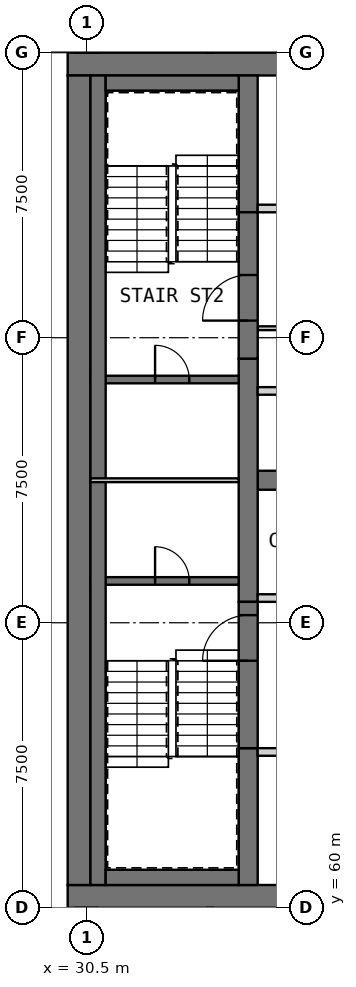
"""IFC4 building model, lengths in metres.
Left out: names, types, materials, properties, quantities, classifications, styles, units other than length and angle.
Written with IfcOpenShell. Run it as: python <this file> out.ifc"""

import sys

from ifc_helpers import new_model, si_unit, direction, frame, frame_2d, origin, place, context, subcontext, project, spatial, rectangle, extrude, element, fill, save


model = new_model("IFC4")
c1 = context("Model", 3, precision=1e-05, world=origin(), true_north=direction((0.0, 1.0)))
c2 = subcontext(c1, "Body", "Model", "MODEL_VIEW")
j1 = project(units=[si_unit("LENGTHUNIT", "METRE"), si_unit("PLANEANGLEUNIT", "RADIAN")], contexts=[c1])
p1 = place(None, origin())
s1 = spatial("IfcSite", under=j1, at=p1, CompositionType="ELEMENT")
p2 = place(p1, origin())
s2 = spatial("IfcBuilding", under=s1, at=p2, CompositionType="ELEMENT")
p3 = place(p2, frame((0.0, 0.0, 226.7)))
s3 = spatial("IfcBuildingStorey", under=s2, at=p3, CompositionType="ELEMENT", Elevation=226.7)
p4 = place(p3, frame((30.0, 60.3, 0.0), z_axis=(0.0, 0.0, 1.0), x_axis=(1.0, 0.0, 0.0)))
e1 = element("IfcWall", 1, at=p4, inside=s3, PredefinedType="SHEAR", context=c2, shape_type="SweptSolid", body=[
    extrude(rectangle(XDim=30.0, YDim=0.6, at=frame_2d((15.0, 0.0))), origin(), (0.0, 0.0, 1.0), 3.5),
])
p5 = place(p4, frame((21.9, 0.0, 0.0)))
e2 = element("IfcOpeningElement", 2, at=p5, cuts=e1, PredefinedType="OPENING", context=c2, shape_type="SweptSolid", body=[
    extrude(rectangle(XDim=1.8, YDim=2.1, at=frame_2d((0.9, 1.05))), frame((0.0, 0.31, 0.0), z_axis=(0.0, -1.0, 0.0), x_axis=(1.0, 0.0, 0.0)), (0.0, 0.0, 1.0), 0.62),
])
p6 = place(p4, frame((26.5, 0.0, 0.0)))
e3 = element("IfcOpeningElement", 3, at=p6, cuts=e1, PredefinedType="OPENING", context=c2, shape_type="SweptSolid", body=[
    extrude(rectangle(XDim=1.2, YDim=2.1, at=frame_2d((0.6, 1.05))), frame((0.0, 0.31, 0.0), z_axis=(0.0, -1.0, 0.0), x_axis=(1.0, 0.0, 0.0)), (0.0, 0.0, 1.0), 0.62),
])
p7 = place(p3, frame((30.0, 82.2, 0.0), z_axis=(0.0, 0.0, 1.0), x_axis=(1.0, 0.0, 0.0)))
e4 = element("IfcWall", 4, at=p7, inside=s3, PredefinedType="SHEAR", context=c2, shape_type="SweptSolid", body=[
    extrude(rectangle(XDim=30.0, YDim=0.6, at=frame_2d((15.0, 0.0))), origin(), (0.0, 0.0, 1.0), 3.5),
])
p8 = place(p3, frame((30.3, 60.6, 0.0), z_axis=(0.0, 0.0, 1.0), x_axis=(0.0, 1.0, 0.0)))
e5 = element("IfcWall", 5, at=p8, inside=s3, PredefinedType="SHEAR", context=c2, shape_type="SweptSolid", body=[
    extrude(rectangle(XDim=21.3, YDim=0.6, at=frame_2d((10.65, 0.0))), origin(), (0.0, 0.0, 1.0), 3.5),
])
p9 = place(p3, frame((35.0, 71.25, 0.0), z_axis=(0.0, 0.0, 1.0), x_axis=(1.0, 0.0, 0.0)))
e6 = element("IfcWall", 6, at=p9, inside=s3, PredefinedType="SHEAR", context=c2, shape_type="SweptSolid", body=[
    extrude(rectangle(XDim=15.6, YDim=0.5, at=frame_2d((7.8, 0.0))), origin(), (0.0, 0.0, 1.0), 3.5),
])
p10 = place(p3, frame((34.75, 60.6, 0.0), z_axis=(0.0, 0.0, 1.0), x_axis=(0.0, 1.0, 0.0)))
e7 = element("IfcWall", 7, at=p10, inside=s3, PredefinedType="SHEAR", context=c2, shape_type="SweptSolid", body=[
    extrude(rectangle(XDim=3.6, YDim=0.5, at=frame_2d((1.8, 0.0))), origin(), (0.0, 0.0, 1.0), 3.5),
])
p11 = place(p3, frame((34.75, 68.05, 0.0), z_axis=(0.0, 0.0, 1.0), x_axis=(0.0, 1.0, 0.0)))
e8 = element("IfcWall", 8, at=p11, inside=s3, PredefinedType="SHEAR", context=c2, shape_type="SweptSolid", body=[
    extrude(rectangle(XDim=6.4, YDim=0.5, at=frame_2d((3.2, 0.0))), origin(), (0.0, 0.0, 1.0), 3.5),
])
p12 = place(p3, frame((34.75, 78.3, 0.0), z_axis=(0.0, 0.0, 1.0), x_axis=(0.0, 1.0, 0.0)))
e9 = element("IfcWall", 9, at=p12, inside=s3, PredefinedType="SHEAR", context=c2, shape_type="SweptSolid", body=[
    extrude(rectangle(XDim=3.6, YDim=0.5, at=frame_2d((1.8, 0.0))), origin(), (0.0, 0.0, 1.0), 3.5),
])
p13 = place(p2, frame((0.0, 0.0, 34.0)))
s4 = spatial("IfcBuildingStorey", under=s2, at=p13, CompositionType="ELEMENT", Elevation=34.0)
for number, where, z_axis, x_axis in (
    (10, (29.7, 61.05, 0.0), (0.0, 0.0, 1.0), (0.0, 1.0, 0.0)),
    (11, (29.7, 65.925, 0.0), (0.0, 0.0, 1.0), (0.0, 1.0, 0.0)),
    (12, (29.7, 70.8, 0.0), (0.0, 0.0, 1.0), (0.0, 1.0, 0.0)),
    (13, (29.7, 75.675, 0.0), (0.0, 0.0, 1.0), (0.0, 1.0, 0.0)),
    (14, (29.7, 80.55, 0.0), (0.0, 0.0, 1.0), (0.0, 1.0, 0.0)),
):
    element("IfcWall", number, at=place(p13, frame(where, z_axis=z_axis, x_axis=x_axis)), inside=s4, PredefinedType="SOLIDWALL", context=c2, shape_type="SweptSolid", body=[
        extrude(rectangle(XDim=0.9, YDim=0.6, at=frame_2d((0.45, 0.0))), origin(), (0.0, 0.0, 1.0), 286.2),
    ])
p14 = place(p3, frame((35.0, 64.1, 0.0), z_axis=(0.0, 0.0, 1.0), x_axis=(1.0, 0.0, 0.0)))
e15 = element("IfcWall", 15, at=p14, inside=s3, PredefinedType="PARTITIONING", context=c2, shape_type="SweptSolid", body=[
    extrude(rectangle(XDim=15.6, YDim=0.2, at=frame_2d((7.8, 0.0))), origin(), (0.0, 0.0, 1.0), 3.25),
])
p15 = place(p14, frame((7.35, 0.0, 0.0)))
e16 = element("IfcOpeningElement", 16, at=p15, cuts=e15, PredefinedType="OPENING", context=c2, shape_type="SweptSolid", body=[
    extrude(rectangle(XDim=0.9, YDim=2.1, at=frame_2d((0.45, 1.05))), frame((0.0, 0.11, 0.0), z_axis=(0.0, -1.0, 0.0), x_axis=(1.0, 0.0, 0.0)), (0.0, 0.0, 1.0), 0.22),
])
p16 = place(p3, frame((35.0, 68.15, 0.0), z_axis=(0.0, 0.0, 1.0), x_axis=(1.0, 0.0, 0.0)))
e17 = element("IfcWall", 17, at=p16, inside=s3, PredefinedType="PARTITIONING", context=c2, shape_type="SweptSolid", body=[
    extrude(rectangle(XDim=15.6, YDim=0.2, at=frame_2d((7.8, 0.0))), origin(), (0.0, 0.0, 1.0), 3.25),
])
p17 = place(p16, frame((2.15, 0.0, 0.0)))
e18 = element("IfcOpeningElement", 18, at=p17, cuts=e17, PredefinedType="OPENING", context=c2, shape_type="SweptSolid", body=[
    extrude(rectangle(XDim=0.9, YDim=2.1, at=frame_2d((0.45, 1.05))), frame((0.0, 0.11, 0.0), z_axis=(0.0, -1.0, 0.0), x_axis=(1.0, 0.0, 0.0)), (0.0, 0.0, 1.0), 0.22),
])
p18 = place(p16, frame((7.35, 0.0, 0.0)))
e19 = element("IfcOpeningElement", 19, at=p18, cuts=e17, PredefinedType="OPENING", context=c2, shape_type="SweptSolid", body=[
    extrude(rectangle(XDim=0.9, YDim=2.1, at=frame_2d((0.45, 1.05))), frame((0.0, 0.11, 0.0), z_axis=(0.0, -1.0, 0.0), x_axis=(1.0, 0.0, 0.0)), (0.0, 0.0, 1.0), 0.22),
])
p19 = place(p16, frame((12.55, 0.0, 0.0)))
e20 = element("IfcOpeningElement", 20, at=p19, cuts=e17, PredefinedType="OPENING", context=c2, shape_type="SweptSolid", body=[
    extrude(rectangle(XDim=0.9, YDim=2.1, at=frame_2d((0.45, 1.05))), frame((0.0, 0.11, 0.0), z_axis=(0.0, -1.0, 0.0), x_axis=(1.0, 0.0, 0.0)), (0.0, 0.0, 1.0), 0.22),
])
p20 = place(p3, frame((35.0, 73.6, 0.0), z_axis=(0.0, 0.0, 1.0), x_axis=(1.0, 0.0, 0.0)))
e21 = element("IfcWall", 21, at=p20, inside=s3, PredefinedType="SOLIDWALL", context=c2, shape_type="SweptSolid", body=[
    extrude(rectangle(XDim=15.6, YDim=0.2, at=frame_2d((7.8, 0.0))), origin(), (0.0, 0.0, 1.0), 3.5),
])
p21 = place(p20, frame((0.75, 0.0, 0.0)))
e22 = element("IfcOpeningElement", 22, at=p21, cuts=e21, PredefinedType="OPENING", context=c2, shape_type="SweptSolid", body=[
    extrude(rectangle(XDim=1.1, YDim=2.1, at=frame_2d((0.55, 1.05))), frame((0.0, 0.11, 0.0), z_axis=(0.0, -1.0, 0.0), x_axis=(1.0, 0.0, 0.0)), (0.0, 0.0, 1.0), 0.22),
])
p22 = place(p20, frame((3.35, 0.0, 0.0)))
e23 = element("IfcOpeningElement", 23, at=p22, cuts=e21, PredefinedType="OPENING", context=c2, shape_type="SweptSolid", body=[
    extrude(rectangle(XDim=1.1, YDim=2.1, at=frame_2d((0.55, 1.05))), frame((0.0, 0.11, 0.0), z_axis=(0.0, -1.0, 0.0), x_axis=(1.0, 0.0, 0.0)), (0.0, 0.0, 1.0), 0.22),
])
p23 = place(p20, frame((5.95, 0.0, 0.0)))
e24 = element("IfcOpeningElement", 24, at=p23, cuts=e21, PredefinedType="OPENING", context=c2, shape_type="SweptSolid", body=[
    extrude(rectangle(XDim=1.1, YDim=2.1, at=frame_2d((0.55, 1.05))), frame((0.0, 0.11, 0.0), z_axis=(0.0, -1.0, 0.0), x_axis=(1.0, 0.0, 0.0)), (0.0, 0.0, 1.0), 0.22),
])
p24 = place(p20, frame((8.55, 0.0, 0.0)))
e25 = element("IfcOpeningElement", 25, at=p24, cuts=e21, PredefinedType="OPENING", context=c2, shape_type="SweptSolid", body=[
    extrude(rectangle(XDim=1.1, YDim=2.1, at=frame_2d((0.55, 1.05))), frame((0.0, 0.11, 0.0), z_axis=(0.0, -1.0, 0.0), x_axis=(1.0, 0.0, 0.0)), (0.0, 0.0, 1.0), 0.22),
])
p25 = place(p20, frame((11.15, 0.0, 0.0)))
e26 = element("IfcOpeningElement", 26, at=p25, cuts=e21, PredefinedType="OPENING", context=c2, shape_type="SweptSolid", body=[
    extrude(rectangle(XDim=1.1, YDim=2.1, at=frame_2d((0.55, 1.05))), frame((0.0, 0.11, 0.0), z_axis=(0.0, -1.0, 0.0), x_axis=(1.0, 0.0, 0.0)), (0.0, 0.0, 1.0), 0.22),
])
p26 = place(p20, frame((13.75, 0.0, 0.0)))
e27 = element("IfcOpeningElement", 27, at=p26, cuts=e21, PredefinedType="OPENING", context=c2, shape_type="SweptSolid", body=[
    extrude(rectangle(XDim=1.1, YDim=2.1, at=frame_2d((0.55, 1.05))), frame((0.0, 0.11, 0.0), z_axis=(0.0, -1.0, 0.0), x_axis=(1.0, 0.0, 0.0)), (0.0, 0.0, 1.0), 0.22),
])
p27 = place(p3, frame((35.0, 78.4, 0.0), z_axis=(0.0, 0.0, 1.0), x_axis=(1.0, 0.0, 0.0)))
e28 = element("IfcWall", 28, at=p27, inside=s3, PredefinedType="SOLIDWALL", context=c2, shape_type="SweptSolid", body=[
    extrude(rectangle(XDim=15.6, YDim=0.2, at=frame_2d((7.8, 0.0))), origin(), (0.0, 0.0, 1.0), 3.5),
])
p28 = place(p27, frame((0.75, 0.0, 0.0)))
e29 = element("IfcOpeningElement", 29, at=p28, cuts=e28, PredefinedType="OPENING", context=c2, shape_type="SweptSolid", body=[
    extrude(rectangle(XDim=1.1, YDim=2.1, at=frame_2d((0.55, 1.05))), frame((0.0, 0.11, 0.0), z_axis=(0.0, -1.0, 0.0), x_axis=(1.0, 0.0, 0.0)), (0.0, 0.0, 1.0), 0.22),
])
p29 = place(p27, frame((3.35, 0.0, 0.0)))
e30 = element("IfcOpeningElement", 30, at=p29, cuts=e28, PredefinedType="OPENING", context=c2, shape_type="SweptSolid", body=[
    extrude(rectangle(XDim=1.1, YDim=2.1, at=frame_2d((0.55, 1.05))), frame((0.0, 0.11, 0.0), z_axis=(0.0, -1.0, 0.0), x_axis=(1.0, 0.0, 0.0)), (0.0, 0.0, 1.0), 0.22),
])
p30 = place(p27, frame((11.15, 0.0, 0.0)))
e31 = element("IfcOpeningElement", 31, at=p30, cuts=e28, PredefinedType="OPENING", context=c2, shape_type="SweptSolid", body=[
    extrude(rectangle(XDim=1.1, YDim=2.1, at=frame_2d((0.55, 1.05))), frame((0.0, 0.11, 0.0), z_axis=(0.0, -1.0, 0.0), x_axis=(1.0, 0.0, 0.0)), (0.0, 0.0, 1.0), 0.22),
])
p31 = place(p27, frame((13.75, 0.0, 0.0)))
e32 = element("IfcOpeningElement", 32, at=p31, cuts=e28, PredefinedType="OPENING", context=c2, shape_type="SweptSolid", body=[
    extrude(rectangle(XDim=1.1, YDim=2.1, at=frame_2d((0.55, 1.05))), frame((0.0, 0.11, 0.0), z_axis=(0.0, -1.0, 0.0), x_axis=(1.0, 0.0, 0.0)), (0.0, 0.0, 1.0), 0.22),
])
p32 = place(p3, frame((35.0, 75.25, 0.0), z_axis=(0.0, 0.0, 1.0), x_axis=(1.0, 0.0, 0.0)))
e33 = element("IfcWall", 33, at=p32, inside=s3, PredefinedType="PARTITIONING", context=c2, shape_type="SweptSolid", body=[
    extrude(rectangle(XDim=5.25, YDim=0.1, at=frame_2d((2.625, 0.0))), origin(), (0.0, 0.0, 1.0), 3.25),
])
p33 = place(p3, frame((34.75, 64.2, 0.0), z_axis=(0.0, 0.0, 1.0), x_axis=(0.0, 1.0, 0.0)))
e34 = element("IfcWall", 34, at=p33, inside=s3, PredefinedType="SOLIDWALL", context=c2, shape_type="SweptSolid", body=[
    extrude(rectangle(XDim=3.85, YDim=0.5, at=frame_2d((1.925, 0.0))), origin(), (0.0, 0.0, 1.0), 2.3),
])
p34 = place(p33, frame((2.3, 0.0, 0.0)))
e35 = element("IfcOpeningElement", 35, at=p34, cuts=e34, PredefinedType="OPENING", context=c2, shape_type="SweptSolid", body=[
    extrude(rectangle(XDim=1.2, YDim=2.1, at=frame_2d((0.6, 1.05))), frame((0.0, 0.26, 0.0), z_axis=(0.0, -1.0, 0.0), x_axis=(1.0, 0.0, 0.0)), (0.0, 0.0, 1.0), 0.52),
])
p35 = place(p3, frame((34.75, 74.45, 0.0), z_axis=(0.0, 0.0, 1.0), x_axis=(0.0, 1.0, 0.0)))
e36 = element("IfcWall", 36, at=p35, inside=s3, PredefinedType="SOLIDWALL", context=c2, shape_type="SweptSolid", body=[
    extrude(rectangle(XDim=3.85, YDim=0.5, at=frame_2d((1.925, 0.0))), origin(), (0.0, 0.0, 1.0), 2.3),
])
p36 = place(p35, frame((1.0, 0.0, 0.0)))
e37 = element("IfcOpeningElement", 37, at=p36, cuts=e36, PredefinedType="OPENING", context=c2, shape_type="SweptSolid", body=[
    extrude(rectangle(XDim=1.2, YDim=2.1, at=frame_2d((0.6, 1.05))), frame((0.0, 0.26, 0.0), z_axis=(0.0, -1.0, 0.0), x_axis=(1.0, 0.0, 0.0)), (0.0, 0.0, 1.0), 0.52),
])
p37 = place(p3, frame((30.6, 68.6, 0.0), z_axis=(0.0, 0.0, 1.0), x_axis=(1.0, 0.0, 0.0)))
e38 = element("IfcWall", 38, at=p37, inside=s3, PredefinedType="SOLIDWALL", context=c2, shape_type="SweptSolid", body=[
    extrude(rectangle(XDim=3.9, YDim=0.2, at=frame_2d((1.95, 0.0))), origin(), (0.0, 0.0, 1.0), 3.25),
])
p38 = place(p37, frame((1.7, 0.0, 0.0)))
e39 = element("IfcOpeningElement", 39, at=p38, cuts=e38, PredefinedType="OPENING", context=c2, shape_type="SweptSolid", body=[
    extrude(rectangle(XDim=0.9, YDim=2.1, at=frame_2d((0.45, 1.05))), frame((0.0, 0.11, 0.0), z_axis=(0.0, -1.0, 0.0), x_axis=(1.0, 0.0, 0.0)), (0.0, 0.0, 1.0), 0.22),
])
p39 = place(p3, frame((30.6, 73.9, 0.0), z_axis=(0.0, 0.0, 1.0), x_axis=(1.0, 0.0, 0.0)))
e40 = element("IfcWall", 40, at=p39, inside=s3, PredefinedType="SOLIDWALL", context=c2, shape_type="SweptSolid", body=[
    extrude(rectangle(XDim=3.9, YDim=0.2, at=frame_2d((1.95, 0.0))), origin(), (0.0, 0.0, 1.0), 3.25),
])
p40 = place(p39, frame((1.7, 0.0, 0.0)))
e41 = element("IfcOpeningElement", 41, at=p40, cuts=e40, PredefinedType="OPENING", context=c2, shape_type="SweptSolid", body=[
    extrude(rectangle(XDim=0.9, YDim=2.1, at=frame_2d((0.45, 1.05))), frame((0.0, 0.11, 0.0), z_axis=(0.0, -1.0, 0.0), x_axis=(1.0, 0.0, 0.0)), (0.0, 0.0, 1.0), 0.22),
])
p41 = place(p3, frame((30.8, 60.6, 0.0), z_axis=(0.0, 0.0, 1.0), x_axis=(0.0, 1.0, 0.0)))
e42 = element("IfcWall", 42, at=p41, inside=s3, PredefinedType="SOLIDWALL", context=c2, shape_type="SweptSolid", body=[
    extrude(rectangle(XDim=21.3, YDim=0.4, at=frame_2d((10.65, 0.0))), origin(), (0.0, 0.0, 1.0), 3.25),
])
for number, where, z_axis, x_axis in (
    (43, (31.0, 60.8, 0.0), (0.0, 0.0, 1.0), (1.0, 0.0, 0.0)),
    (44, (31.0, 81.7, 0.0), (0.0, 0.0, 1.0), (1.0, 0.0, 0.0)),
):
    element("IfcWall", number, at=place(p3, frame(where, z_axis=z_axis, x_axis=x_axis)), inside=s3, PredefinedType="SOLIDWALL", context=c2, shape_type="SweptSolid", body=[
        extrude(rectangle(XDim=3.5, YDim=0.4, at=frame_2d((1.75, 0.0))), origin(), (0.0, 0.0, 1.0), 3.25),
    ])
p42 = place(p3, frame((30.6, 71.25, 0.0), z_axis=(0.0, 0.0, 1.0), x_axis=(1.0, 0.0, 0.0)))
e45 = element("IfcWall", 45, at=p42, inside=s3, PredefinedType="PARTITIONING", context=c2, shape_type="SweptSolid", body=[
    extrude(rectangle(XDim=3.9, YDim=0.1, at=frame_2d((1.95, 0.0))), origin(), (0.0, 0.0, 1.0), 3.25),
])
p43 = place(p34, origin())
e46 = element("IfcDoor", 46, at=p43, inside=s3, OperationType="SINGLE_SWING_LEFT", PredefinedType="DOOR", context=c2, shape_type="SweptSolid", body=[
    extrude(rectangle(XDim=1.2, YDim=2.1, at=frame_2d((0.6, 1.05))), frame((0.0, 0.025, 0.0), z_axis=(0.0, -1.0, 0.0), x_axis=(1.0, 0.0, 0.0)), (0.0, 0.0, 1.0), 0.05),
])
fill(e35, e46)
p44 = place(p36, origin())
e47 = element("IfcDoor", 47, at=p44, inside=s3, OperationType="SINGLE_SWING_RIGHT", PredefinedType="DOOR", context=c2, shape_type="SweptSolid", body=[
    extrude(rectangle(XDim=1.2, YDim=2.1, at=frame_2d((0.6, 1.05))), frame((0.0, 0.025, 0.0), z_axis=(0.0, -1.0, 0.0), x_axis=(1.0, 0.0, 0.0)), (0.0, 0.0, 1.0), 0.05),
])
fill(e37, e47)
p45 = place(p38, origin())
e48 = element("IfcDoor", 48, at=p45, inside=s3, OperationType="SINGLE_SWING_LEFT", PredefinedType="DOOR", context=c2, shape_type="SweptSolid", body=[
    extrude(rectangle(XDim=0.9, YDim=2.1, at=frame_2d((0.45, 1.05))), frame((0.0, 0.025, 0.0), z_axis=(0.0, -1.0, 0.0), x_axis=(1.0, 0.0, 0.0)), (0.0, 0.0, 1.0), 0.05),
])
fill(e39, e48)
p46 = place(p40, origin())
e49 = element("IfcDoor", 49, at=p46, inside=s3, OperationType="SINGLE_SWING_RIGHT", PredefinedType="DOOR", context=c2, shape_type="SweptSolid", body=[
    extrude(rectangle(XDim=0.9, YDim=2.1, at=frame_2d((0.45, 1.05))), frame((0.0, 0.025, 0.0), z_axis=(0.0, -1.0, 0.0), x_axis=(1.0, 0.0, 0.0)), (0.0, 0.0, 1.0), 0.05),
])
fill(e41, e49)
save(model, sys.argv[1])
